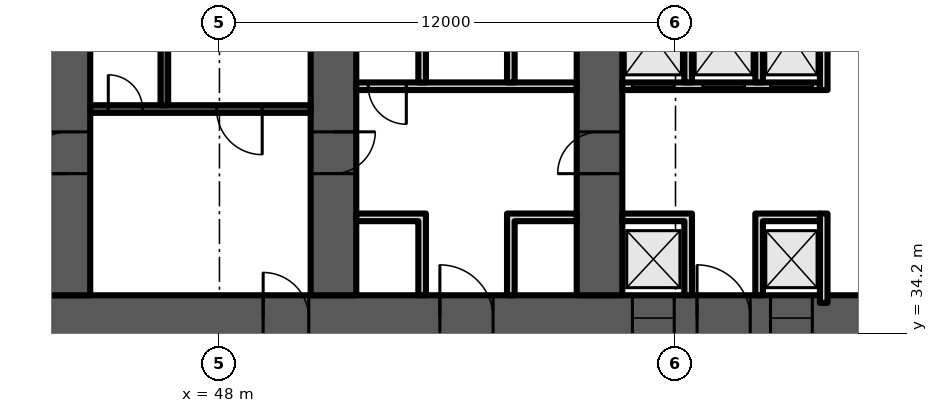
"""IFC4 building model, lengths in metres.
Left out: names, types, materials, properties, quantities, classifications, styles, units other than length and angle.
Written with IfcOpenShell. Run it as: python <this file> out.ifc"""

import sys

from ifc_helpers import new_model, si_unit, direction, frame, frame_2d, origin, place, context, subcontext, project, spatial, polyline, rectangle, outline, extrude, element, fill, save


model = new_model("IFC4")
c1 = context("Model", 3, precision=1e-05, world=origin(), true_north=direction((0.0, 1.0)))
c2 = subcontext(c1, "Body", "Model", "MODEL_VIEW")
j1 = project(units=[si_unit("LENGTHUNIT", "METRE"), si_unit("PLANEANGLEUNIT", "RADIAN")], contexts=[c1])
p1 = place(None, origin())
s1 = spatial("IfcSite", under=j1, at=p1, CompositionType="ELEMENT")
p2 = place(p1, origin())
s2 = spatial("IfcBuilding", under=s1, at=p2, CompositionType="ELEMENT")
p3 = place(p2, frame((0.0, 0.0, 15.0)))
s3 = spatial("IfcBuildingStorey", under=s2, at=p3, CompositionType="ELEMENT", Elevation=15.0)
p4 = place(p3, frame((9.0, 34.6, 0.0), z_axis=(0.0, 0.0, 1.0), x_axis=(1.0, 0.0, 0.0)))
e1 = element("IfcWall", 1, at=p4, inside=s3, PredefinedType="SHEAR", context=c2, shape_type="SweptSolid", body=[
    extrude(rectangle(XDim=56.0, YDim=1.2, at=frame_2d((28.0, 0.0))), origin(), (0.0, 0.0, 1.0), 6.2),
])
p5 = place(p4, frame((3.3, 0.0, 0.0)))
e2 = element("IfcOpeningElement", 2, at=p5, cuts=e1, PredefinedType="OPENING", context=c2, shape_type="SweptSolid", body=[
    extrude(rectangle(XDim=1.0, YDim=2.1, at=frame_2d((0.5, 1.05))), frame((0.0, 0.61, 0.0), z_axis=(0.0, -1.0, 0.0), x_axis=(1.0, 0.0, 0.0)), (0.0, 0.0, 1.0), 1.22),
])
p6 = place(p4, frame((7.867, 0.0, 0.0)))
e3 = element("IfcOpeningElement", 3, at=p6, cuts=e1, PredefinedType="OPENING", context=c2, shape_type="SweptSolid", body=[
    extrude(rectangle(XDim=1.1, YDim=2.1, at=frame_2d((0.55, 1.05))), frame((0.0, 0.61, 0.0), z_axis=(0.0, -1.0, 0.0), x_axis=(1.0, 0.0, 0.0)), (0.0, 0.0, 1.0), 1.22),
])
p7 = place(p4, frame((12.033, 0.0, 0.0)))
e4 = element("IfcOpeningElement", 4, at=p7, cuts=e1, PredefinedType="OPENING", context=c2, shape_type="SweptSolid", body=[
    extrude(rectangle(XDim=1.1, YDim=2.1, at=frame_2d((0.55, 1.05))), frame((0.0, 0.61, 0.0), z_axis=(0.0, -1.0, 0.0), x_axis=(1.0, 0.0, 0.0)), (0.0, 0.0, 1.0), 1.22),
])
p8 = place(p4, frame((9.8, 0.0, 0.0)))
e5 = element("IfcOpeningElement", 5, at=p8, cuts=e1, PredefinedType="OPENING", context=c2, shape_type="SweptSolid", body=[
    extrude(rectangle(XDim=1.4, YDim=2.1, at=frame_2d((0.7, 1.05))), frame((0.0, 0.61, 0.0), z_axis=(0.0, -1.0, 0.0), x_axis=(1.0, 0.0, 0.0)), (0.0, 0.0, 1.0), 1.22),
])
p9 = place(p4, frame((14.65, 0.0, 0.0)))
e6 = element("IfcOpeningElement", 6, at=p9, cuts=e1, PredefinedType="OPENING", context=c2, shape_type="SweptSolid", body=[
    extrude(rectangle(XDim=1.2, YDim=2.1, at=frame_2d((0.6, 1.05))), frame((0.0, 0.61, 0.0), z_axis=(0.0, -1.0, 0.0), x_axis=(1.0, 0.0, 0.0)), (0.0, 0.0, 1.0), 1.22),
])
p10 = place(p4, frame((21.867, 0.0, 0.0)))
e7 = element("IfcOpeningElement", 7, at=p10, cuts=e1, PredefinedType="OPENING", context=c2, shape_type="SweptSolid", body=[
    extrude(rectangle(XDim=1.1, YDim=2.1, at=frame_2d((0.55, 1.05))), frame((0.0, 0.61, 0.0), z_axis=(0.0, -1.0, 0.0), x_axis=(1.0, 0.0, 0.0)), (0.0, 0.0, 1.0), 1.22),
])
p11 = place(p4, frame((26.033, 0.0, 0.0)))
e8 = element("IfcOpeningElement", 8, at=p11, cuts=e1, PredefinedType="OPENING", context=c2, shape_type="SweptSolid", body=[
    extrude(rectangle(XDim=1.1, YDim=2.1, at=frame_2d((0.55, 1.05))), frame((0.0, 0.61, 0.0), z_axis=(0.0, -1.0, 0.0), x_axis=(1.0, 0.0, 0.0)), (0.0, 0.0, 1.0), 1.22),
])
p12 = place(p4, frame((23.8, 0.0, 0.0)))
e9 = element("IfcOpeningElement", 9, at=p12, cuts=e1, PredefinedType="OPENING", context=c2, shape_type="SweptSolid", body=[
    extrude(rectangle(XDim=1.4, YDim=2.1, at=frame_2d((0.7, 1.05))), frame((0.0, 0.61, 0.0), z_axis=(0.0, -1.0, 0.0), x_axis=(1.0, 0.0, 0.0)), (0.0, 0.0, 1.0), 1.22),
])
p13 = place(p4, frame((28.867, 0.0, 0.0)))
e10 = element("IfcOpeningElement", 10, at=p13, cuts=e1, PredefinedType="OPENING", context=c2, shape_type="SweptSolid", body=[
    extrude(rectangle(XDim=1.1, YDim=2.1, at=frame_2d((0.55, 1.05))), frame((0.0, 0.61, 0.0), z_axis=(0.0, -1.0, 0.0), x_axis=(1.0, 0.0, 0.0)), (0.0, 0.0, 1.0), 1.22),
])
p14 = place(p4, frame((33.033, 0.0, 0.0)))
e11 = element("IfcOpeningElement", 11, at=p14, cuts=e1, PredefinedType="OPENING", context=c2, shape_type="SweptSolid", body=[
    extrude(rectangle(XDim=1.1, YDim=2.1, at=frame_2d((0.55, 1.05))), frame((0.0, 0.61, 0.0), z_axis=(0.0, -1.0, 0.0), x_axis=(1.0, 0.0, 0.0)), (0.0, 0.0, 1.0), 1.22),
])
p15 = place(p4, frame((40.15, 0.0, 0.0)))
e12 = element("IfcOpeningElement", 12, at=p15, cuts=e1, PredefinedType="OPENING", context=c2, shape_type="SweptSolid", body=[
    extrude(rectangle(XDim=1.2, YDim=2.1, at=frame_2d((0.6, 1.05))), frame((0.0, 0.61, 0.0), z_axis=(0.0, -1.0, 0.0), x_axis=(1.0, 0.0, 0.0)), (0.0, 0.0, 1.0), 1.22),
])
p16 = place(p4, frame((44.8, 0.0, 0.0)))
e13 = element("IfcOpeningElement", 13, at=p16, cuts=e1, PredefinedType="OPENING", context=c2, shape_type="SweptSolid", body=[
    extrude(rectangle(XDim=1.4, YDim=2.1, at=frame_2d((0.7, 1.05))), frame((0.0, 0.61, 0.0), z_axis=(0.0, -1.0, 0.0), x_axis=(1.0, 0.0, 0.0)), (0.0, 0.0, 1.0), 1.22),
])
p17 = place(p4, frame((49.867, 0.0, 0.0)))
e14 = element("IfcOpeningElement", 14, at=p17, cuts=e1, PredefinedType="OPENING", context=c2, shape_type="SweptSolid", body=[
    extrude(rectangle(XDim=1.1, YDim=2.1, at=frame_2d((0.55, 1.05))), frame((0.0, 0.61, 0.0), z_axis=(0.0, -1.0, 0.0), x_axis=(1.0, 0.0, 0.0)), (0.0, 0.0, 1.0), 1.22),
])
p18 = place(p4, frame((53.5, 0.0, 0.0)))
e15 = element("IfcOpeningElement", 15, at=p18, cuts=e1, PredefinedType="OPENING", context=c2, shape_type="SweptSolid", body=[
    extrude(rectangle(XDim=1.1, YDim=2.1, at=frame_2d((0.55, 1.05))), frame((0.0, 0.61, 0.0), z_axis=(0.0, -1.0, 0.0), x_axis=(1.0, 0.0, 0.0)), (0.0, 0.0, 1.0), 1.22),
])
p19 = place(p4, frame((51.567, 0.0, 0.0)))
e16 = element("IfcOpeningElement", 16, at=p19, cuts=e1, PredefinedType="OPENING", context=c2, shape_type="SweptSolid", body=[
    extrude(rectangle(XDim=1.4, YDim=2.1, at=frame_2d((0.7, 1.05))), frame((0.0, 0.61, 0.0), z_axis=(0.0, -1.0, 0.0), x_axis=(1.0, 0.0, 0.0)), (0.0, 0.0, 1.0), 1.22),
])
p20 = place(p3, frame((44.0, 35.2, 0.0), z_axis=(0.0, 0.0, 1.0), x_axis=(0.0, 1.0, 0.0)))
e17 = element("IfcWall", 17, at=p20, inside=s3, PredefinedType="SHEAR", context=c2, shape_type="SweptSolid", body=[
    extrude(rectangle(XDim=12.8, YDim=1.2, at=frame_2d((6.4, 0.0))), origin(), (0.0, 0.0, 1.0), 6.2),
])
p21 = place(p20, frame((3.2, 0.0, 0.0)))
e18 = element("IfcOpeningElement", 18, at=p21, cuts=e17, PredefinedType="OPENING", context=c2, shape_type="SweptSolid", body=[
    extrude(rectangle(XDim=1.1, YDim=2.1, at=frame_2d((0.55, 1.05))), frame((0.0, 0.61, 0.0), z_axis=(0.0, -1.0, 0.0), x_axis=(1.0, 0.0, 0.0)), (0.0, 0.0, 1.0), 1.22),
])
p22 = place(p20, frame((9.6, 0.0, 0.0)))
e19 = element("IfcOpeningElement", 19, at=p22, cuts=e17, PredefinedType="OPENING", context=c2, shape_type="SweptSolid", body=[
    extrude(rectangle(XDim=1.0, YDim=2.1, at=frame_2d((0.5, 1.05))), frame((0.0, 0.61, 0.0), z_axis=(0.0, -1.0, 0.0), x_axis=(1.0, 0.0, 0.0)), (0.0, 0.0, 1.0), 1.22),
])
p23 = place(p3, frame((51.0, 35.2, 0.0), z_axis=(0.0, 0.0, 1.0), x_axis=(0.0, 1.0, 0.0)))
e20 = element("IfcWall", 20, at=p23, inside=s3, PredefinedType="SHEAR", context=c2, shape_type="SweptSolid", body=[
    extrude(rectangle(XDim=12.8, YDim=1.2, at=frame_2d((6.4, 0.0))), origin(), (0.0, 0.0, 1.0), 6.2),
])
p24 = place(p23, frame((3.2, 0.0, 0.0)))
e21 = element("IfcOpeningElement", 21, at=p24, cuts=e20, PredefinedType="OPENING", context=c2, shape_type="SweptSolid", body=[
    extrude(rectangle(XDim=1.1, YDim=2.1, at=frame_2d((0.55, 1.05))), frame((0.0, 0.61, 0.0), z_axis=(0.0, -1.0, 0.0), x_axis=(1.0, 0.0, 0.0)), (0.0, 0.0, 1.0), 1.22),
])
p25 = place(p3, frame((58.0, 35.2, 0.0), z_axis=(0.0, 0.0, 1.0), x_axis=(0.0, 1.0, 0.0)))
e22 = element("IfcWall", 22, at=p25, inside=s3, PredefinedType="SHEAR", context=c2, shape_type="SweptSolid", body=[
    extrude(rectangle(XDim=12.8, YDim=1.2, at=frame_2d((6.4, 0.0))), origin(), (0.0, 0.0, 1.0), 6.2),
])
p26 = place(p25, frame((10.134, 0.0, 0.0)))
e23 = element("IfcOpeningElement", 23, at=p26, cuts=e22, PredefinedType="OPENING", context=c2, shape_type="SweptSolid", body=[
    extrude(rectangle(XDim=1.0, YDim=2.1, at=frame_2d((0.5, 1.05))), frame((0.0, 0.61, 0.0), z_axis=(0.0, -1.0, 0.0), x_axis=(1.0, 0.0, 0.0)), (0.0, 0.0, 1.0), 1.22),
])
p27 = place(p25, frame((3.2, 0.0, 0.0)))
e24 = element("IfcOpeningElement", 24, at=p27, cuts=e22, PredefinedType="OPENING", context=c2, shape_type="SweptSolid", body=[
    extrude(rectangle(XDim=1.1, YDim=2.1, at=frame_2d((0.55, 1.05))), frame((0.0, 0.61, 0.0), z_axis=(0.0, -1.0, 0.0), x_axis=(1.0, 0.0, 0.0)), (0.0, 0.0, 1.0), 1.22),
])
p28 = place(p3, frame((44.6, 40.1, 0.0), z_axis=(0.0, 0.0, 1.0), x_axis=(1.0, 0.0, 0.0)))
e25 = element("IfcWall", 25, at=p28, inside=s3, PredefinedType="SHEAR", context=c2, shape_type="SweptSolid", body=[
    extrude(rectangle(XDim=5.8, YDim=0.2, at=frame_2d((2.9, 0.0))), origin(), (0.0, 0.0, 1.0), 6.2),
])
p29 = place(p28, frame((3.325, 0.0, 0.0)))
e26 = element("IfcOpeningElement", 26, at=p29, cuts=e25, PredefinedType="OPENING", context=c2, shape_type="SweptSolid", body=[
    extrude(rectangle(XDim=1.2, YDim=2.1, at=frame_2d((0.6, 1.05))), frame((0.0, 0.11, 0.0), z_axis=(0.0, -1.0, 0.0), x_axis=(1.0, 0.0, 0.0)), (0.0, 0.0, 1.0), 0.22),
])
p30 = place(p28, frame((0.475, 0.0, 0.0)))
e27 = element("IfcOpeningElement", 27, at=p30, cuts=e25, PredefinedType="OPENING", context=c2, shape_type="SweptSolid", body=[
    extrude(rectangle(XDim=0.9, YDim=2.1, at=frame_2d((0.45, 1.05))), frame((0.0, 0.11, 0.0), z_axis=(0.0, -1.0, 0.0), x_axis=(1.0, 0.0, 0.0)), (0.0, 0.0, 1.0), 0.22),
])
p31 = place(p3, frame((46.55, 40.2, 0.0), z_axis=(0.0, 0.0, 1.0), x_axis=(0.0, 1.0, 0.0)))
e28 = element("IfcWall", 28, at=p31, inside=s3, PredefinedType="SHEAR", context=c2, shape_type="SweptSolid", body=[
    extrude(rectangle(XDim=7.2, YDim=0.2, at=frame_2d((3.6, 0.0))), origin(), (0.0, 0.0, 1.0), 6.2),
])
p32 = place(p3, frame((51.6, 40.7, 0.0), z_axis=(0.0, 0.0, 1.0), x_axis=(1.0, 0.0, 0.0)))
e29 = element("IfcWall", 29, at=p32, inside=s3, PredefinedType="PARTITIONING", context=c2, shape_type="SweptSolid", body=[
    extrude(rectangle(XDim=5.8, YDim=0.2, at=frame_2d((2.9, 0.0))), origin(), (0.0, 0.0, 1.0), 6.2),
])
p33 = place(p32, frame((0.317, 0.0, 0.0)))
e30 = element("IfcOpeningElement", 30, at=p33, cuts=e29, PredefinedType="OPENING", context=c2, shape_type="SweptSolid", body=[
    extrude(rectangle(XDim=1.0, YDim=2.1, at=frame_2d((0.5, 1.05))), frame((0.0, 0.11, 0.0), z_axis=(0.0, -1.0, 0.0), x_axis=(1.0, 0.0, 0.0)), (0.0, 0.0, 1.0), 0.22),
])
p34 = place(p3, frame((0.0, 0.0, -0.0)))
e31 = element("IfcWall", 31, at=p34, inside=s3, PredefinedType="PARTITIONING", context=c2, shape_type="SweptSolid", body=[
    extrude(outline(polyline([(53.233, 37.15), (51.6, 37.15), (51.6, 37.35), (53.233, 37.35), (53.433, 37.35), (53.433, 35.2), (53.233, 35.2), (53.233, 37.15)])), origin(), (0.0, 0.0, 1.0), 6.2),
])
p35 = place(p3, frame((0.0, 0.0, -0.0)))
e32 = element("IfcWall", 32, at=p35, inside=s3, PredefinedType="PARTITIONING", context=c2, shape_type="SweptSolid", body=[
    extrude(outline(polyline([(55.567, 37.35), (55.767, 37.35), (57.4, 37.35), (57.4, 37.15), (55.767, 37.15), (55.767, 35.2), (55.567, 35.2), (55.567, 37.35)])), origin(), (0.0, 0.0, 1.0), 6.2),
])
p36 = place(p3, frame((0.0, 0.0, -0.0)))
e33 = element("IfcWall", 33, at=p36, inside=s3, PredefinedType="PARTITIONING", context=c2, shape_type="SweptSolid", body=[
    extrude(outline(polyline([(53.233, 40.8), (53.233, 43.8), (53.433, 43.8), (53.433, 40.8), (53.233, 40.8)])), origin(), (0.0, 0.0, 1.0), 6.2),
])
p37 = place(p3, frame((0.0, 0.0, -0.0)))
e34 = element("IfcWall", 34, at=p37, inside=s3, PredefinedType="PARTITIONING", context=c2, shape_type="SweptSolid", body=[
    extrude(outline(polyline([(55.567, 40.8), (55.567, 43.8), (55.767, 43.8), (55.767, 40.8), (55.567, 40.8)])), origin(), (0.0, 0.0, 1.0), 6.2),
])
p38 = place(p3, frame((58.6, 40.7, 0.0), z_axis=(0.0, 0.0, 1.0), x_axis=(1.0, 0.0, 0.0)))
e35 = element("IfcWall", 35, at=p38, inside=s3, PredefinedType="PARTITIONING", context=c2, shape_type="SweptSolid", body=[
    extrude(rectangle(XDim=5.2, YDim=0.2, at=frame_2d((2.6, 0.0))), origin(), (0.0, 0.0, 1.0), 6.2),
])
p39 = place(p38, frame((0.267, 0.0, 0.0)))
e36 = element("IfcOpeningElement", 36, at=p39, cuts=e35, PredefinedType="OPENING", context=c2, shape_type="SweptSolid", body=[
    extrude(rectangle(XDim=1.1, YDim=2.1, at=frame_2d((0.55, 1.05))), frame((0.0, 0.11, 0.0), z_axis=(0.0, -1.0, 0.0), x_axis=(1.0, 0.0, 0.0)), (0.0, 0.0, 1.0), 0.22),
])
p40 = place(p38, frame((2.117, 0.0, 0.0)))
e37 = element("IfcOpeningElement", 37, at=p40, cuts=e35, PredefinedType="OPENING", context=c2, shape_type="SweptSolid", body=[
    extrude(rectangle(XDim=1.1, YDim=2.1, at=frame_2d((0.55, 1.05))), frame((0.0, 0.11, 0.0), z_axis=(0.0, -1.0, 0.0), x_axis=(1.0, 0.0, 0.0)), (0.0, 0.0, 1.0), 0.22),
])
p41 = place(p38, frame((3.9, 0.0, 0.0)))
e38 = element("IfcOpeningElement", 38, at=p41, cuts=e35, PredefinedType="OPENING", context=c2, shape_type="SweptSolid", body=[
    extrude(rectangle(XDim=1.1, YDim=2.1, at=frame_2d((0.55, 1.05))), frame((0.0, 0.11, 0.0), z_axis=(0.0, -1.0, 0.0), x_axis=(1.0, 0.0, 0.0)), (0.0, 0.0, 1.0), 0.22),
])
p42 = place(p3, frame((0.0, 0.0, -0.0)))
e39 = element("IfcWall", 39, at=p42, inside=s3, PredefinedType="PARTITIONING", context=c2, shape_type="SweptSolid", body=[
    extrude(outline(polyline([(60.233, 37.15), (58.6, 37.15), (58.6, 37.35), (60.233, 37.35), (60.433, 37.35), (60.433, 35.2), (60.233, 35.2), (60.233, 37.15)])), origin(), (0.0, 0.0, 1.0), 6.2),
])
p43 = place(p3, frame((0.0, 0.0, -0.0)))
e40 = element("IfcWall", 40, at=p43, inside=s3, PredefinedType="PARTITIONING", context=c2, shape_type="SweptSolid", body=[
    extrude(outline(polyline([(62.1, 37.35), (62.3, 37.35), (63.8, 37.35), (63.8, 37.15), (62.3, 37.15), (62.3, 35.2), (62.1, 35.2), (62.1, 37.35)])), origin(), (0.0, 0.0, 1.0), 6.2),
])
p44 = place(p3, frame((0.0, 0.0, -0.0)))
e41 = element("IfcWall", 41, at=p44, inside=s3, PredefinedType="PARTITIONING", context=c2, shape_type="SweptSolid", body=[
    extrude(outline(polyline([(60.433, 40.8), (60.233, 40.8), (60.233, 43.8), (58.6, 43.8), (58.6, 44.0), (63.8, 44.0), (63.8, 43.8), (62.3, 43.8), (62.3, 40.8), (62.1, 40.8), (62.1, 43.8), (60.433, 43.8), (60.433, 40.8)])), origin(), (0.0, 0.0, 1.0), 6.2),
])
p45 = place(p3, frame((63.9, 35.0, 0.0), z_axis=(0.0, 0.0, 1.0), x_axis=(0.0, 1.0, 0.0)))
e42 = element("IfcWall", 42, at=p45, inside=s3, PredefinedType="PARTITIONING", context=c2, shape_type="SweptSolid", body=[
    extrude(rectangle(XDim=2.35, YDim=0.2, at=frame_2d((1.175, 0.0))), origin(), (0.0, 0.0, 1.0), 6.2),
])
p46 = place(p3, frame((63.9, 40.6, 0.0), z_axis=(0.0, 0.0, 1.0), x_axis=(0.0, 1.0, 0.0)))
e43 = element("IfcWall", 43, at=p46, inside=s3, PredefinedType="PARTITIONING", context=c2, shape_type="SweptSolid", body=[
    extrude(rectangle(XDim=3.4, YDim=0.2, at=frame_2d((1.7, 0.0))), origin(), (0.0, 0.0, 1.0), 6.2),
])
p47 = place(p29, origin())
e44 = element("IfcDoor", 44, at=p47, inside=s3, OperationType="SINGLE_SWING_RIGHT", PredefinedType="DOOR", context=c2, shape_type="SweptSolid", body=[
    extrude(rectangle(XDim=1.2, YDim=2.1, at=frame_2d((0.6, 1.05))), frame((0.0, 0.025, 0.0), z_axis=(0.0, -1.0, 0.0), x_axis=(1.0, 0.0, 0.0)), (0.0, 0.0, 1.0), 0.05),
])
fill(e26, e44)
p48 = place(p30, origin())
e45 = element("IfcDoor", 45, at=p48, inside=s3, OperationType="SINGLE_SWING_LEFT", PredefinedType="DOOR", context=c2, shape_type="SweptSolid", body=[
    extrude(rectangle(XDim=0.9, YDim=2.1, at=frame_2d((0.45, 1.05))), frame((0.0, 0.025, 0.0), z_axis=(0.0, -1.0, 0.0), x_axis=(1.0, 0.0, 0.0)), (0.0, 0.0, 1.0), 0.05),
])
fill(e27, e45)
p49 = place(p15, origin())
e46 = element("IfcDoor", 46, at=p49, inside=s3, OperationType="SINGLE_SWING_LEFT", PredefinedType="DOOR", context=c2, shape_type="SweptSolid", body=[
    extrude(rectangle(XDim=1.2, YDim=2.1, at=frame_2d((0.6, 1.05))), frame((0.0, 0.025, 0.0), z_axis=(0.0, -1.0, 0.0), x_axis=(1.0, 0.0, 0.0)), (0.0, 0.0, 1.0), 0.05),
])
fill(e12, e46)
p50 = place(p16, origin())
e47 = element("IfcDoor", 47, at=p50, inside=s3, OperationType="DOUBLE_DOOR_SINGLE_SWING", PredefinedType="DOOR", context=c2, shape_type="SweptSolid", body=[
    extrude(rectangle(XDim=1.4, YDim=2.1, at=frame_2d((0.7, 1.05))), frame((0.0, 0.025, 0.0), z_axis=(0.0, -1.0, 0.0), x_axis=(1.0, 0.0, 0.0)), (0.0, 0.0, 1.0), 0.05),
])
fill(e13, e47)
p51 = place(p33, origin())
e48 = element("IfcDoor", 48, at=p51, inside=s3, OperationType="SINGLE_SWING_RIGHT", PredefinedType="DOOR", context=c2, shape_type="SweptSolid", body=[
    extrude(rectangle(XDim=1.0, YDim=2.1, at=frame_2d((0.5, 1.05))), frame((0.0, 0.025, 0.0), z_axis=(0.0, -1.0, 0.0), x_axis=(1.0, 0.0, 0.0)), (0.0, 0.0, 1.0), 0.05),
])
fill(e30, e48)
p52 = place(p17, origin())
e49 = element("IfcDoor", 49, at=p52, inside=s3, OperationType="DOUBLE_DOOR_SLIDING", PredefinedType="DOOR", context=c2, shape_type="SweptSolid", body=[
    extrude(rectangle(XDim=1.1, YDim=2.1, at=frame_2d((0.55, 1.05))), frame((0.0, 0.025, 0.0), z_axis=(0.0, -1.0, 0.0), x_axis=(1.0, 0.0, 0.0)), (0.0, 0.0, 1.0), 0.05),
])
fill(e14, e49)
p53 = place(p18, origin())
e50 = element("IfcDoor", 50, at=p53, inside=s3, OperationType="DOUBLE_DOOR_SLIDING", PredefinedType="DOOR", context=c2, shape_type="SweptSolid", body=[
    extrude(rectangle(XDim=1.1, YDim=2.1, at=frame_2d((0.55, 1.05))), frame((0.0, 0.025, 0.0), z_axis=(0.0, -1.0, 0.0), x_axis=(1.0, 0.0, 0.0)), (0.0, 0.0, 1.0), 0.05),
])
fill(e15, e50)
p54 = place(p19, origin())
e51 = element("IfcDoor", 51, at=p54, inside=s3, OperationType="DOUBLE_DOOR_SINGLE_SWING", PredefinedType="DOOR", context=c2, shape_type="SweptSolid", body=[
    extrude(rectangle(XDim=1.4, YDim=2.1, at=frame_2d((0.7, 1.05))), frame((0.0, 0.025, 0.0), z_axis=(0.0, -1.0, 0.0), x_axis=(1.0, 0.0, 0.0)), (0.0, 0.0, 1.0), 0.05),
])
fill(e16, e51)
p55 = place(p39, origin())
e52 = element("IfcDoor", 52, at=p55, inside=s3, OperationType="DOUBLE_DOOR_SLIDING", PredefinedType="DOOR", context=c2, shape_type="SweptSolid", body=[
    extrude(rectangle(XDim=1.1, YDim=2.1, at=frame_2d((0.55, 1.05))), frame((0.0, 0.025, 0.0), z_axis=(0.0, -1.0, 0.0), x_axis=(1.0, 0.0, 0.0)), (0.0, 0.0, 1.0), 0.05),
])
fill(e36, e52)
p56 = place(p40, origin())
e53 = element("IfcDoor", 53, at=p56, inside=s3, OperationType="DOUBLE_DOOR_SLIDING", PredefinedType="DOOR", context=c2, shape_type="SweptSolid", body=[
    extrude(rectangle(XDim=1.1, YDim=2.1, at=frame_2d((0.55, 1.05))), frame((0.0, 0.025, 0.0), z_axis=(0.0, -1.0, 0.0), x_axis=(1.0, 0.0, 0.0)), (0.0, 0.0, 1.0), 0.05),
])
fill(e37, e53)
p57 = place(p41, origin())
e54 = element("IfcDoor", 54, at=p57, inside=s3, OperationType="DOUBLE_DOOR_SLIDING", PredefinedType="DOOR", context=c2, shape_type="SweptSolid", body=[
    extrude(rectangle(XDim=1.1, YDim=2.1, at=frame_2d((0.55, 1.05))), frame((0.0, 0.025, 0.0), z_axis=(0.0, -1.0, 0.0), x_axis=(1.0, 0.0, 0.0)), (0.0, 0.0, 1.0), 0.05),
])
fill(e38, e54)
p58 = place(p21, origin())
e55 = element("IfcDoor", 55, at=p58, inside=s3, OperationType="SINGLE_SWING_LEFT", PredefinedType="DOOR", context=c2, shape_type="SweptSolid", body=[
    extrude(rectangle(XDim=1.1, YDim=2.1, at=frame_2d((0.55, 1.05))), frame((0.0, 0.025, 0.0), z_axis=(0.0, -1.0, 0.0), x_axis=(1.0, 0.0, 0.0)), (0.0, 0.0, 1.0), 0.05),
])
fill(e18, e55)
p59 = place(p24, origin())
e56 = element("IfcDoor", 56, at=p59, inside=s3, OperationType="SINGLE_SWING_RIGHT", PredefinedType="DOOR", context=c2, shape_type="SweptSolid", body=[
    extrude(rectangle(XDim=1.1, YDim=2.1, at=frame_2d((0.55, 1.05))), frame((0.0, 0.025, 0.0), z_axis=(0.0, -1.0, 0.0), x_axis=(1.0, 0.0, 0.0)), (0.0, 0.0, 1.0), 0.05),
])
fill(e21, e56)
p60 = place(p27, origin())
e57 = element("IfcDoor", 57, at=p60, inside=s3, OperationType="SINGLE_SWING_LEFT", PredefinedType="DOOR", context=c2, shape_type="SweptSolid", body=[
    extrude(rectangle(XDim=1.1, YDim=2.1, at=frame_2d((0.55, 1.05))), frame((0.0, 0.025, 0.0), z_axis=(0.0, -1.0, 0.0), x_axis=(1.0, 0.0, 0.0)), (0.0, 0.0, 1.0), 0.05),
])
fill(e24, e57)
save(model, sys.argv[1])
